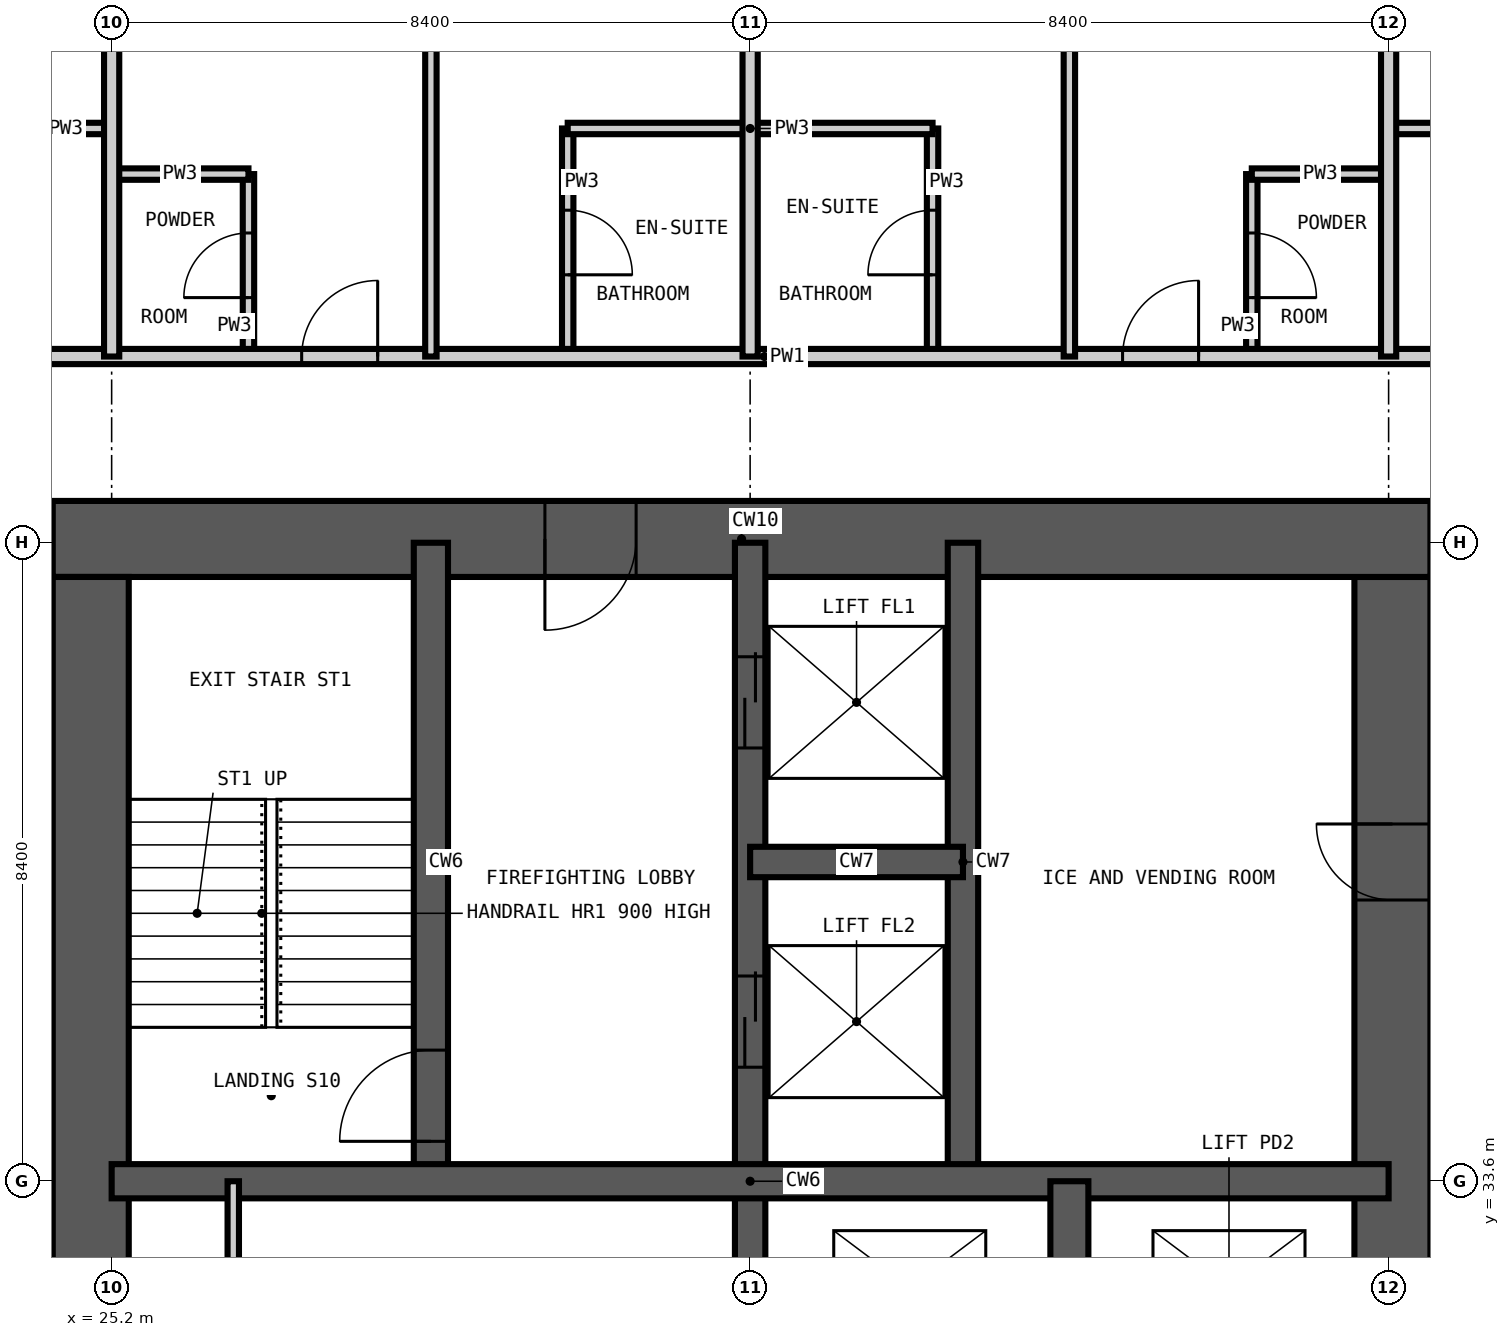
"""IFC4 building model, lengths in metres.
Left out: names, types, materials, properties, quantities, classifications, styles, units other than length and angle.
Written with IfcOpenShell. Run it as: python <this file> out.ifc"""

import sys

from ifc_helpers import new_model, si_unit, direction, frame, frame_2d, origin, place, context, subcontext, project, spatial, rectangle, extrude, element, fill, save


model = new_model("IFC4")
c1 = context("Model", 3, precision=1e-05, world=origin(), true_north=direction((0.0, 1.0)))
c2 = subcontext(c1, "Body", "Model", "MODEL_VIEW")
j1 = project(units=[si_unit("LENGTHUNIT", "METRE"), si_unit("PLANEANGLEUNIT", "RADIAN")], contexts=[c1])
p1 = place(None, origin())
s1 = spatial("IfcSite", under=j1, at=p1, CompositionType="ELEMENT")
p2 = place(p1, origin())
s2 = spatial("IfcBuilding", under=s1, at=p2, CompositionType="ELEMENT")
p3 = place(p2, frame((0.0, 0.0, 225.6)))
s3 = spatial("IfcBuildingStorey", under=s2, at=p3, CompositionType="ELEMENT", Elevation=225.6)
p4 = place(p3, frame((42.05, 17.25, -0.35), z_axis=(0.0, 0.0, 1.0), x_axis=(0.0, 1.0, 0.0)))
e1 = element("IfcWall", 1, at=p4, inside=s3, PredefinedType="SHEAR", context=c2, shape_type="SweptSolid", body=[
    extrude(rectangle(XDim=24.3, YDim=1.0, at=frame_2d((12.15, 0.0))), origin(), (0.0, 0.0, 1.0), 3.9),
])
p5 = place(p4, frame((0.35, 0.0, 0.35)))
e2 = element("IfcOpeningElement", 2, at=p5, cuts=e1, PredefinedType="OPENING", context=c2, shape_type="SweptSolid", body=[
    extrude(rectangle(XDim=1.2, YDim=2.2, at=frame_2d((0.6, 1.1))), frame((0.0, 0.51, 0.0), z_axis=(0.0, -1.0, 0.0), x_axis=(1.0, 0.0, 0.0)), (0.0, 0.0, 1.0), 1.02),
])
p6 = place(p4, frame((11.25, 0.0, 0.35)))
e3 = element("IfcOpeningElement", 3, at=p6, cuts=e1, PredefinedType="OPENING", context=c2, shape_type="SweptSolid", body=[
    extrude(rectangle(XDim=1.8, YDim=2.2, at=frame_2d((0.9, 1.1))), frame((0.0, 0.51, 0.0), z_axis=(0.0, -1.0, 0.0), x_axis=(1.0, 0.0, 0.0)), (0.0, 0.0, 1.0), 1.02),
])
p7 = place(p4, frame((20.05, 0.0, 0.35)))
e4 = element("IfcOpeningElement", 4, at=p7, cuts=e1, PredefinedType="OPENING", context=c2, shape_type="SweptSolid", body=[
    extrude(rectangle(XDim=1.0, YDim=2.1, at=frame_2d((0.5, 1.05))), frame((0.0, 0.51, 0.0), z_axis=(0.0, -1.0, 0.0), x_axis=(1.0, 0.0, 0.0)), (0.0, 0.0, 1.0), 1.02),
])
p8 = place(p3, frame((42.55, 42.05, -0.35), z_axis=(0.0, 0.0, 1.0), x_axis=(-1.0, 0.0, 0.0)))
e5 = element("IfcWall", 5, at=p8, inside=s3, PredefinedType="SHEAR", context=c2, shape_type="SweptSolid", body=[
    extrude(rectangle(XDim=18.125, YDim=1.0, at=frame_2d((9.062, 0.0))), origin(), (0.0, 0.0, 1.0), 3.9),
])
p9 = place(p8, frame((10.45, 0.0, 0.35)))
e6 = element("IfcOpeningElement", 6, at=p9, cuts=e5, PredefinedType="OPENING", context=c2, shape_type="SweptSolid", body=[
    extrude(rectangle(XDim=1.2, YDim=2.2, at=frame_2d((0.6, 1.1))), frame((0.0, 0.51, 0.0), z_axis=(0.0, -1.0, 0.0), x_axis=(1.0, 0.0, 0.0)), (0.0, 0.0, 1.0), 1.02),
])
p10 = place(p3, frame((24.925, 41.55, -0.35), z_axis=(0.0, 0.0, 1.0), x_axis=(0.0, -1.0, 0.0)))
e7 = element("IfcWall", 7, at=p10, inside=s3, PredefinedType="SHEAR", context=c2, shape_type="SweptSolid", body=[
    extrude(rectangle(XDim=24.3, YDim=1.0, at=frame_2d((12.15, 0.0))), origin(), (0.0, 0.0, 1.0), 3.9),
])
p11 = place(p10, frame((11.65, 0.0, 0.35)))
e8 = element("IfcOpeningElement", 8, at=p11, cuts=e7, PredefinedType="OPENING", context=c2, shape_type="SweptSolid", body=[
    extrude(rectangle(XDim=1.0, YDim=2.1, at=frame_2d((0.5, 1.05))), frame((0.0, 0.51, 0.0), z_axis=(0.0, -1.0, 0.0), x_axis=(1.0, 0.0, 0.0)), (0.0, 0.0, 1.0), 1.02),
])
p12 = place(p3, frame((33.6, 16.8, -0.35), z_axis=(0.0, 0.0, 1.0), x_axis=(0.0, 1.0, 0.0)))
e9 = element("IfcWall", 9, at=p12, inside=s3, PredefinedType="SHEAR", context=c2, shape_type="SweptSolid", body=[
    extrude(rectangle(XDim=25.2, YDim=0.4, at=frame_2d((12.6, 0.0))), origin(), (0.0, 0.0, 1.0), 3.9),
])
p13 = place(p12, frame((22.5, 0.0, 0.35)))
e10 = element("IfcOpeningElement", 10, at=p13, cuts=e9, PredefinedType="OPENING", context=c2, shape_type="SweptSolid", body=[
    extrude(rectangle(XDim=1.2, YDim=2.2, at=frame_2d((0.6, 1.1))), frame((0.0, 0.21, 0.0), z_axis=(0.0, -1.0, 0.0), x_axis=(1.0, 0.0, 0.0)), (0.0, 0.0, 1.0), 0.42),
])
p14 = place(p12, frame((18.3, 0.0, 0.35)))
e11 = element("IfcOpeningElement", 11, at=p14, cuts=e9, PredefinedType="OPENING", context=c2, shape_type="SweptSolid", body=[
    extrude(rectangle(XDim=1.2, YDim=2.2, at=frame_2d((0.6, 1.1))), frame((0.0, 0.21, 0.0), z_axis=(0.0, -1.0, 0.0), x_axis=(1.0, 0.0, 0.0)), (0.0, 0.0, 1.0), 0.42),
])
p15 = place(p12, frame((9.3, 0.0, 0.35)))
e12 = element("IfcOpeningElement", 12, at=p15, cuts=e9, PredefinedType="OPENING", context=c2, shape_type="SweptSolid", body=[
    extrude(rectangle(XDim=1.0, YDim=2.1, at=frame_2d((0.5, 1.05))), frame((0.0, 0.21, 0.0), z_axis=(0.0, -1.0, 0.0), x_axis=(1.0, 0.0, 0.0)), (0.0, 0.0, 1.0), 0.42),
])
p16 = place(p3, frame((36.4, 33.6, -0.35), z_axis=(0.0, 0.0, 1.0), x_axis=(0.0, 1.0, 0.0)))
e13 = element("IfcWall", 13, at=p16, inside=s3, PredefinedType="SHEAR", context=c2, shape_type="SweptSolid", body=[
    extrude(rectangle(XDim=8.4, YDim=0.4, at=frame_2d((4.2, 0.0))), origin(), (0.0, 0.0, 1.0), 3.9),
])
p17 = place(p3, frame((33.6, 37.8, -0.35), z_axis=(0.0, 0.0, 1.0), x_axis=(1.0, 0.0, 0.0)))
e14 = element("IfcWall", 14, at=p17, inside=s3, PredefinedType="SHEAR", context=c2, shape_type="SweptSolid", body=[
    extrude(rectangle(XDim=2.8, YDim=0.4, at=frame_2d((1.4, 0.0))), origin(), (0.0, 0.0, 1.0), 3.9),
])
p18 = place(p3, frame((29.4, 33.6, -0.35), z_axis=(0.0, 0.0, 1.0), x_axis=(0.0, 1.0, 0.0)))
e15 = element("IfcWall", 15, at=p18, inside=s3, PredefinedType="SHEAR", context=c2, shape_type="SweptSolid", body=[
    extrude(rectangle(XDim=8.4, YDim=0.45, at=frame_2d((4.2, 0.0))), origin(), (0.0, 0.0, 1.0), 3.9),
])
p19 = place(p18, frame((0.525, 0.0, 0.35)))
e16 = element("IfcOpeningElement", 16, at=p19, cuts=e15, PredefinedType="OPENING", context=c2, shape_type="SweptSolid", body=[
    extrude(rectangle(XDim=1.2, YDim=2.2, at=frame_2d((0.6, 1.1))), frame((0.0, 0.235, 0.0), z_axis=(0.0, -1.0, 0.0), x_axis=(1.0, 0.0, 0.0)), (0.0, 0.0, 1.0), 0.47),
])
p20 = place(p3, frame((25.2, 33.6, -0.35), z_axis=(0.0, 0.0, 1.0), x_axis=(1.0, 0.0, 0.0)))
e17 = element("IfcWall", 17, at=p20, inside=s3, PredefinedType="SHEAR", context=c2, shape_type="SweptSolid", body=[
    extrude(rectangle(XDim=16.8, YDim=0.45, at=frame_2d((8.4, 0.0))), origin(), (0.0, 0.0, 1.0), 3.9),
])
p21 = place(p3, frame((37.8, 30.8, -0.35), z_axis=(0.0, 0.0, 1.0), x_axis=(0.0, 1.0, 0.0)))
e18 = element("IfcWall", 18, at=p21, inside=s3, PredefinedType="SHEAR", context=c2, shape_type="SweptSolid", body=[
    extrude(rectangle(XDim=2.8, YDim=0.5, at=frame_2d((1.4, 0.0))), origin(), (0.0, 0.0, 1.0), 3.9),
])
p22 = place(p3, frame((27.0, 44.45, 0.0), z_axis=(0.0, 0.0, 1.0), x_axis=(0.0, 1.0, 0.0)))
e19 = element("IfcWall", 19, at=p22, inside=s3, PredefinedType="PARTITIONING", context=c2, shape_type="SweptSolid", body=[
    extrude(rectangle(XDim=2.4, YDim=0.15, at=frame_2d((1.2, 0.0))), origin(), (0.0, 0.0, 1.0), 3.55),
])
p23 = place(p22, frame((0.775, 0.0, 0.0)))
e20 = element("IfcOpeningElement", 20, at=p23, cuts=e19, PredefinedType="OPENING", context=c2, shape_type="SweptSolid", body=[
    extrude(rectangle(XDim=0.85, YDim=2.1, at=frame_2d((0.425, 1.05))), frame((0.0, 0.085, 0.0), z_axis=(0.0, -1.0, 0.0), x_axis=(1.0, 0.0, 0.0)), (0.0, 0.0, 1.0), 0.17),
])
p24 = place(p3, frame((31.2, 44.45, 0.0), z_axis=(0.0, 0.0, 1.0), x_axis=(0.0, 1.0, 0.0)))
e21 = element("IfcWall", 21, at=p24, inside=s3, PredefinedType="PARTITIONING", context=c2, shape_type="SweptSolid", body=[
    extrude(rectangle(XDim=3.0, YDim=0.15, at=frame_2d((1.5, 0.0))), origin(), (0.0, 0.0, 1.0), 3.55),
])
p25 = place(p24, frame((1.075, 0.0, 0.0)))
e22 = element("IfcOpeningElement", 22, at=p25, cuts=e21, PredefinedType="OPENING", context=c2, shape_type="SweptSolid", body=[
    extrude(rectangle(XDim=0.85, YDim=2.1, at=frame_2d((0.425, 1.05))), frame((0.0, 0.085, 0.0), z_axis=(0.0, -1.0, 0.0), x_axis=(1.0, 0.0, 0.0)), (0.0, 0.0, 1.0), 0.17),
])
p26 = place(p3, frame((36.0, 44.45, 0.0), z_axis=(0.0, 0.0, 1.0), x_axis=(0.0, 1.0, 0.0)))
e23 = element("IfcWall", 23, at=p26, inside=s3, PredefinedType="PARTITIONING", context=c2, shape_type="SweptSolid", body=[
    extrude(rectangle(XDim=3.0, YDim=0.15, at=frame_2d((1.5, 0.0))), origin(), (0.0, 0.0, 1.0), 3.55),
])
p27 = place(p26, frame((1.075, 0.0, 0.0)))
e24 = element("IfcOpeningElement", 24, at=p27, cuts=e23, PredefinedType="OPENING", context=c2, shape_type="SweptSolid", body=[
    extrude(rectangle(XDim=0.85, YDim=2.1, at=frame_2d((0.425, 1.05))), frame((0.0, 0.085, 0.0), z_axis=(0.0, -1.0, 0.0), x_axis=(1.0, 0.0, 0.0)), (0.0, 0.0, 1.0), 0.17),
])
p28 = place(p3, frame((40.2, 44.45, 0.0), z_axis=(0.0, 0.0, 1.0), x_axis=(0.0, 1.0, 0.0)))
e25 = element("IfcWall", 25, at=p28, inside=s3, PredefinedType="PARTITIONING", context=c2, shape_type="SweptSolid", body=[
    extrude(rectangle(XDim=2.4, YDim=0.15, at=frame_2d((1.2, 0.0))), origin(), (0.0, 0.0, 1.0), 3.55),
])
p29 = place(p28, frame((0.775, 0.0, 0.0)))
e26 = element("IfcOpeningElement", 26, at=p29, cuts=e25, PredefinedType="OPENING", context=c2, shape_type="SweptSolid", body=[
    extrude(rectangle(XDim=0.85, YDim=2.1, at=frame_2d((0.425, 1.05))), frame((0.0, 0.085, 0.0), z_axis=(0.0, -1.0, 0.0), x_axis=(1.0, 0.0, 0.0)), (0.0, 0.0, 1.0), 0.17),
])
for number, where, z_axis, x_axis in (
    (27, (25.2, 46.85, 0.0), (0.0, 0.0, 1.0), (1.0, 0.0, 0.0)),
    (28, (40.2, 46.85, 0.0), (0.0, 0.0, 1.0), (1.0, 0.0, 0.0)),
):
    element("IfcWall", number, at=place(p3, frame(where, z_axis=z_axis, x_axis=x_axis)), inside=s3, PredefinedType="PARTITIONING", context=c2, shape_type="SweptSolid", body=[
        extrude(rectangle(XDim=1.8, YDim=0.15, at=frame_2d((0.9, 0.0))), origin(), (0.0, 0.0, 1.0), 3.55),
    ])
p30 = place(p3, frame((21.925, 47.45, 0.0), z_axis=(0.0, 0.0, 1.0), x_axis=(1.0, 0.0, 0.0)))
e29 = element("IfcWall", 29, at=p30, inside=s3, PredefinedType="PARTITIONING", context=c2, shape_type="SweptSolid", body=[
    extrude(rectangle(XDim=3.275, YDim=0.15, at=frame_2d((1.637, 0.0))), origin(), (0.0, 0.0, 1.0), 3.55),
])
p31 = place(p30, frame((1.212, 0.0, 0.0)))
e30 = element("IfcOpeningElement", 30, at=p31, cuts=e29, PredefinedType="OPENING", context=c2, shape_type="SweptSolid", body=[
    extrude(rectangle(XDim=0.85, YDim=2.1, at=frame_2d((0.425, 1.05))), frame((0.0, 0.085, 0.0), z_axis=(0.0, -1.0, 0.0), x_axis=(1.0, 0.0, 0.0)), (0.0, 0.0, 1.0), 0.17),
])
p32 = place(p3, frame((31.2, 47.45, 0.0), z_axis=(0.0, 0.0, 1.0), x_axis=(1.0, 0.0, 0.0)))
e31 = element("IfcWall", 31, at=p32, inside=s3, PredefinedType="PARTITIONING", context=c2, shape_type="SweptSolid", body=[
    extrude(rectangle(XDim=4.8, YDim=0.15, at=frame_2d((2.4, 0.0))), origin(), (0.0, 0.0, 1.0), 3.55),
])
p33 = place(p3, frame((42.0, 47.45, 0.0), z_axis=(0.0, 0.0, 1.0), x_axis=(1.0, 0.0, 0.0)))
e32 = element("IfcWall", 32, at=p33, inside=s3, PredefinedType="PARTITIONING", context=c2, shape_type="SweptSolid", body=[
    extrude(rectangle(XDim=3.65, YDim=0.15, at=frame_2d((1.825, 0.0))), origin(), (0.0, 0.0, 1.0), 3.55),
])
p34 = place(p33, frame((1.4, 0.0, 0.0)))
e33 = element("IfcOpeningElement", 33, at=p34, cuts=e32, PredefinedType="OPENING", context=c2, shape_type="SweptSolid", body=[
    extrude(rectangle(XDim=0.85, YDim=2.1, at=frame_2d((0.425, 1.05))), frame((0.0, 0.085, 0.0), z_axis=(0.0, -1.0, 0.0), x_axis=(1.0, 0.0, 0.0)), (0.0, 0.0, 1.0), 0.17),
])
p35 = place(p3, frame((21.925, 44.45, 0.0), z_axis=(0.0, 0.0, 1.0), x_axis=(1.0, 0.0, 0.0)))
e34 = element("IfcWall", 34, at=p35, inside=s3, PredefinedType="PARTITIONING", context=c2, shape_type="SweptSolid", body=[
    extrude(rectangle(XDim=23.725, YDim=0.2, at=frame_2d((11.862, 0.0))), origin(), (0.0, 0.0, 1.0), 3.55),
])
p36 = place(p35, frame((5.775, 0.0, 0.0)))
e35 = element("IfcOpeningElement", 35, at=p36, cuts=e34, PredefinedType="OPENING", context=c2, shape_type="SweptSolid", body=[
    extrude(rectangle(XDim=1.0, YDim=2.2, at=frame_2d((0.5, 1.1))), frame((0.0, 0.11, 0.0), z_axis=(0.0, -1.0, 0.0), x_axis=(1.0, 0.0, 0.0)), (0.0, 0.0, 1.0), 0.22),
])
p37 = place(p35, frame((16.575, 0.0, 0.0)))
e36 = element("IfcOpeningElement", 36, at=p37, cuts=e34, PredefinedType="OPENING", context=c2, shape_type="SweptSolid", body=[
    extrude(rectangle(XDim=1.0, YDim=2.2, at=frame_2d((0.5, 1.1))), frame((0.0, 0.11, 0.0), z_axis=(0.0, -1.0, 0.0), x_axis=(1.0, 0.0, 0.0)), (0.0, 0.0, 1.0), 0.22),
])
for number, where, z_axis, x_axis in (
    (37, (25.2, 44.45, 0.0), (0.0, 0.0, 1.0), (0.0, 1.0, 0.0)),
    (38, (33.6, 44.45, 0.0), (0.0, 0.0, 1.0), (0.0, 1.0, 0.0)),
    (39, (42.0, 44.45, 0.0), (0.0, 0.0, 1.0), (0.0, 1.0, 0.0)),
):
    element("IfcWall", number, at=place(p3, frame(where, z_axis=z_axis, x_axis=x_axis)), inside=s3, PredefinedType="PARTITIONING", context=c2, shape_type="SweptSolid", body=[
        extrude(rectangle(XDim=10.168, YDim=0.2, at=frame_2d((5.084, 0.0))), origin(), (0.0, 0.0, 1.0), 3.55),
    ])
p38 = place(p3, frame((26.8, 25.2, 0.0), z_axis=(0.0, 0.0, 1.0), x_axis=(0.0, 1.0, 0.0)))
e40 = element("IfcWall", 40, at=p38, inside=s3, PredefinedType="PARTITIONING", context=c2, shape_type="SweptSolid", body=[
    extrude(rectangle(XDim=8.4, YDim=0.15, at=frame_2d((4.2, 0.0))), origin(), (0.0, 0.0, 1.0), 3.55),
])
p39 = place(p38, frame((0.9, 0.0, 0.0)))
e41 = element("IfcOpeningElement", 41, at=p39, cuts=e40, PredefinedType="OPENING", context=c2, shape_type="SweptSolid", body=[
    extrude(rectangle(XDim=1.0, YDim=2.1, at=frame_2d((0.5, 1.05))), frame((0.0, 0.085, 0.0), z_axis=(0.0, -1.0, 0.0), x_axis=(1.0, 0.0, 0.0)), (0.0, 0.0, 1.0), 0.17),
])
p40 = place(p38, frame((5.1, 0.0, 0.0)))
e42 = element("IfcOpeningElement", 42, at=p40, cuts=e40, PredefinedType="OPENING", context=c2, shape_type="SweptSolid", body=[
    extrude(rectangle(XDim=1.0, YDim=2.1, at=frame_2d((0.5, 1.05))), frame((0.0, 0.085, 0.0), z_axis=(0.0, -1.0, 0.0), x_axis=(1.0, 0.0, 0.0)), (0.0, 0.0, 1.0), 0.17),
])
p41 = place(p3, frame((29.4, 44.45, 0.0), z_axis=(0.0, 0.0, 1.0), x_axis=(0.0, 1.0, 0.0)))
e43 = element("IfcWall", 43, at=p41, inside=s3, PredefinedType="PARTITIONING", context=c2, shape_type="SweptSolid", body=[
    extrude(rectangle(XDim=10.168, YDim=0.15, at=frame_2d((5.084, 0.0))), origin(), (0.0, 0.0, 1.0), 3.55),
])
p42 = place(p41, frame((4.625, 0.0, 0.0)))
e44 = element("IfcOpeningElement", 44, at=p42, cuts=e43, PredefinedType="OPENING", context=c2, shape_type="SweptSolid", body=[
    extrude(rectangle(XDim=0.9, YDim=2.1, at=frame_2d((0.45, 1.05))), frame((0.0, 0.085, 0.0), z_axis=(0.0, -1.0, 0.0), x_axis=(1.0, 0.0, 0.0)), (0.0, 0.0, 1.0), 0.17),
])
p43 = place(p3, frame((37.8, 44.45, 0.0), z_axis=(0.0, 0.0, 1.0), x_axis=(0.0, 1.0, 0.0)))
e45 = element("IfcWall", 45, at=p43, inside=s3, PredefinedType="PARTITIONING", context=c2, shape_type="SweptSolid", body=[
    extrude(rectangle(XDim=10.168, YDim=0.15, at=frame_2d((5.084, 0.0))), origin(), (0.0, 0.0, 1.0), 3.55),
])
p44 = place(p43, frame((4.625, 0.0, 0.0)))
e46 = element("IfcOpeningElement", 46, at=p44, cuts=e45, PredefinedType="OPENING", context=c2, shape_type="SweptSolid", body=[
    extrude(rectangle(XDim=0.9, YDim=2.1, at=frame_2d((0.45, 1.05))), frame((0.0, 0.085, 0.0), z_axis=(0.0, -1.0, 0.0), x_axis=(1.0, 0.0, 0.0)), (0.0, 0.0, 1.0), 0.17),
])
p45 = place(p19, origin())
e47 = element("IfcDoor", 47, at=p45, inside=s3, OperationType="SINGLE_SWING_LEFT", PredefinedType="DOOR", context=c2, shape_type="SweptSolid", body=[
    extrude(rectangle(XDim=1.2, YDim=2.2, at=frame_2d((0.6, 1.1))), frame((0.0, 0.025, 0.0), z_axis=(0.0, -1.0, 0.0), x_axis=(1.0, 0.0, 0.0)), (0.0, 0.0, 1.0), 0.05),
])
fill(e16, e47)
p46 = place(p13, origin())
e48 = element("IfcDoor", 48, at=p46, inside=s3, OperationType="DOUBLE_DOOR_SLIDING", PredefinedType="DOOR", context=c2, shape_type="SweptSolid", body=[
    extrude(rectangle(XDim=1.2, YDim=2.2, at=frame_2d((0.6, 1.1))), frame((0.0, 0.025, 0.0), z_axis=(0.0, -1.0, 0.0), x_axis=(1.0, 0.0, 0.0)), (0.0, 0.0, 1.0), 0.05),
])
fill(e10, e48)
p47 = place(p14, origin())
e49 = element("IfcDoor", 49, at=p47, inside=s3, OperationType="DOUBLE_DOOR_SLIDING", PredefinedType="DOOR", context=c2, shape_type="SweptSolid", body=[
    extrude(rectangle(XDim=1.2, YDim=2.2, at=frame_2d((0.6, 1.1))), frame((0.0, 0.025, 0.0), z_axis=(0.0, -1.0, 0.0), x_axis=(1.0, 0.0, 0.0)), (0.0, 0.0, 1.0), 0.05),
])
fill(e11, e49)
p48 = place(p36, origin())
e50 = element("IfcDoor", 50, at=p48, inside=s3, OperationType="SINGLE_SWING_RIGHT", PredefinedType="DOOR", context=c2, shape_type="SweptSolid", body=[
    extrude(rectangle(XDim=1.0, YDim=2.2, at=frame_2d((0.5, 1.1))), frame((0.0, 0.025, 0.0), z_axis=(0.0, -1.0, 0.0), x_axis=(1.0, 0.0, 0.0)), (0.0, 0.0, 1.0), 0.05),
])
fill(e35, e50)
p49 = place(p23, origin())
e51 = element("IfcDoor", 51, at=p49, inside=s3, OperationType="SINGLE_SWING_LEFT", PredefinedType="DOOR", context=c2, shape_type="SweptSolid", body=[
    extrude(rectangle(XDim=0.85, YDim=2.1, at=frame_2d((0.425, 1.05))), frame((0.0, 0.025, 0.0), z_axis=(0.0, -1.0, 0.0), x_axis=(1.0, 0.0, 0.0)), (0.0, 0.0, 1.0), 0.05),
])
fill(e20, e51)
p50 = place(p25, frame((0.85, 0.0, 0.0), z_axis=(0.0, 0.0, 1.0), x_axis=(-1.0, 0.0, 0.0)))
e52 = element("IfcDoor", 52, at=p50, inside=s3, OperationType="SINGLE_SWING_RIGHT", PredefinedType="DOOR", context=c2, shape_type="SweptSolid", body=[
    extrude(rectangle(XDim=0.85, YDim=2.1, at=frame_2d((0.425, 1.05))), frame((0.0, 0.025, 0.0), z_axis=(0.0, -1.0, 0.0), x_axis=(1.0, 0.0, 0.0)), (0.0, 0.0, 1.0), 0.05),
])
fill(e22, e52)
p51 = place(p37, origin())
e53 = element("IfcDoor", 53, at=p51, inside=s3, OperationType="SINGLE_SWING_RIGHT", PredefinedType="DOOR", context=c2, shape_type="SweptSolid", body=[
    extrude(rectangle(XDim=1.0, YDim=2.2, at=frame_2d((0.5, 1.1))), frame((0.0, 0.025, 0.0), z_axis=(0.0, -1.0, 0.0), x_axis=(1.0, 0.0, 0.0)), (0.0, 0.0, 1.0), 0.05),
])
fill(e36, e53)
p52 = place(p29, frame((0.85, 0.0, 0.0), z_axis=(0.0, 0.0, 1.0), x_axis=(-1.0, 0.0, 0.0)))
e54 = element("IfcDoor", 54, at=p52, inside=s3, OperationType="SINGLE_SWING_RIGHT", PredefinedType="DOOR", context=c2, shape_type="SweptSolid", body=[
    extrude(rectangle(XDim=0.85, YDim=2.1, at=frame_2d((0.425, 1.05))), frame((0.0, 0.025, 0.0), z_axis=(0.0, -1.0, 0.0), x_axis=(1.0, 0.0, 0.0)), (0.0, 0.0, 1.0), 0.05),
])
fill(e26, e54)
p53 = place(p27, origin())
e55 = element("IfcDoor", 55, at=p53, inside=s3, OperationType="SINGLE_SWING_LEFT", PredefinedType="DOOR", context=c2, shape_type="SweptSolid", body=[
    extrude(rectangle(XDim=0.85, YDim=2.1, at=frame_2d((0.425, 1.05))), frame((0.0, 0.025, 0.0), z_axis=(0.0, -1.0, 0.0), x_axis=(1.0, 0.0, 0.0)), (0.0, 0.0, 1.0), 0.05),
])
fill(e24, e55)
p54 = place(p9, origin())
e56 = element("IfcDoor", 56, at=p54, inside=s3, OperationType="SINGLE_SWING_RIGHT", PredefinedType="DOOR", context=c2, shape_type="SweptSolid", body=[
    extrude(rectangle(XDim=1.2, YDim=2.2, at=frame_2d((0.6, 1.1))), frame((0.0, 0.025, 0.0), z_axis=(0.0, -1.0, 0.0), x_axis=(1.0, 0.0, 0.0)), (0.0, 0.0, 1.0), 0.05),
])
fill(e6, e56)
p55 = place(p7, origin())
e57 = element("IfcDoor", 57, at=p55, inside=s3, OperationType="SINGLE_SWING_RIGHT", PredefinedType="DOOR", context=c2, shape_type="SweptSolid", body=[
    extrude(rectangle(XDim=1.0, YDim=2.1, at=frame_2d((0.5, 1.05))), frame((0.0, 0.025, 0.0), z_axis=(0.0, -1.0, 0.0), x_axis=(1.0, 0.0, 0.0)), (0.0, 0.0, 1.0), 0.05),
])
fill(e4, e57)
save(model, sys.argv[1])
